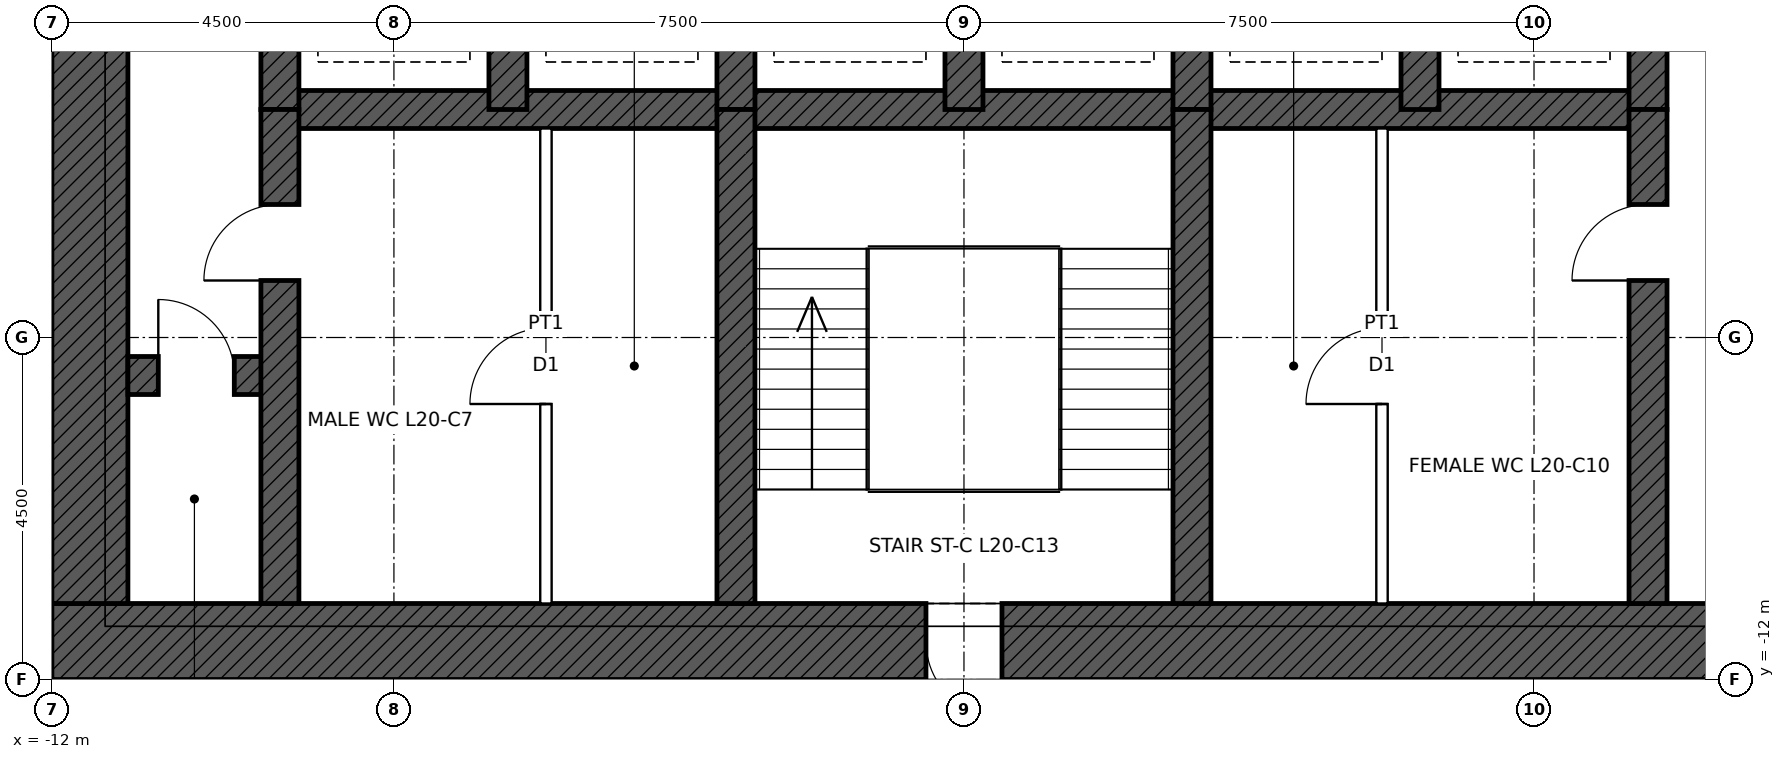
"""IFC4 building model, lengths in metres.
Left out: names, types, materials, properties, quantities, classifications, styles, units other than length and angle.
Written with IfcOpenShell. Run it as: python <this file> out.ifc"""

import sys

from ifc_helpers import new_model, si_unit, direction, frame, frame_2d, origin, place, context, subcontext, project, spatial, rectangle, extrude, element, fill, save


model = new_model("IFC4")
c1 = context("Model", 3, precision=1e-05, world=origin(), true_north=direction((0.0, 1.0)))
c2 = subcontext(c1, "Body", "Model", "MODEL_VIEW")
j1 = project(units=[si_unit("LENGTHUNIT", "METRE"), si_unit("PLANEANGLEUNIT", "RADIAN")], contexts=[c1])
p1 = place(None, origin())
s1 = spatial("IfcSite", under=j1, at=p1, CompositionType="ELEMENT")
p2 = place(p1, origin())
s2 = spatial("IfcBuilding", under=s1, at=p2, CompositionType="ELEMENT")
p3 = place(p2, frame((0.0, 0.0, 104.4)))
s3 = spatial("IfcBuildingStorey", under=s2, at=p3, CompositionType="ELEMENT", Elevation=104.4)
p4 = place(p3, frame((12.0, -11.5, 0.0), z_axis=(0.0, 0.0, 1.0), x_axis=(-1.0, 0.0, 0.0)))
e1 = element("IfcWall", 1, at=p4, inside=s3, PredefinedType="SHEAR", context=c2, shape_type="SweptSolid", body=[
    extrude(rectangle(XDim=24.0, YDim=1.0, at=frame_2d((12.0, 0.0))), origin(), (0.0, 0.0, 1.0), 4.5),
])
p5 = place(p4, frame((11.5, 0.0, 0.0)))
e2 = element("IfcOpeningElement", 2, at=p5, cuts=e1, PredefinedType="OPENING", context=c2, shape_type="SweptSolid", body=[
    extrude(rectangle(XDim=1.0, YDim=2.1, at=frame_2d((0.5, 1.05))), frame((0.0, 0.51, 0.0), z_axis=(0.0, -1.0, 0.0), x_axis=(1.0, 0.0, 0.0)), (0.0, 0.0, 1.0), 1.02),
])
p6 = place(p4, frame((1.0, 0.0, 0.0)))
e3 = element("IfcOpeningElement", 3, at=p6, cuts=e1, PredefinedType="OPENING", context=c2, shape_type="SweptSolid", body=[
    extrude(rectangle(XDim=1.0, YDim=2.4, at=frame_2d((0.5, 1.2))), frame((0.0, 0.51, 0.0), z_axis=(0.0, -1.0, 0.0), x_axis=(1.0, 0.0, 0.0)), (0.0, 0.0, 1.0), 1.02),
])
p7 = place(p3, frame((-11.5, -11.0, 0.0), z_axis=(0.0, 0.0, 1.0), x_axis=(0.0, 1.0, 0.0)))
e4 = element("IfcWall", 4, at=p7, inside=s3, PredefinedType="SHEAR", context=c2, shape_type="SweptSolid", body=[
    extrude(rectangle(XDim=22.0, YDim=1.0, at=frame_2d((11.0, 0.0))), origin(), (0.0, 0.0, 1.0), 4.5),
])
p8 = place(p7, frame((10.5, 0.0, 0.0)))
e5 = element("IfcOpeningElement", 5, at=p8, cuts=e4, PredefinedType="OPENING", context=c2, shape_type="SweptSolid", body=[
    extrude(rectangle(XDim=1.0, YDim=2.4, at=frame_2d((0.5, 1.2))), frame((0.0, 0.51, 0.0), z_axis=(0.0, -1.0, 0.0), x_axis=(1.0, 0.0, 0.0)), (0.0, 0.0, 1.0), 1.02),
])
p9 = place(p3, frame((-9.0, -4.5, 0.0), z_axis=(0.0, 0.0, 1.0), x_axis=(1.0, 0.0, 0.0)))
e6 = element("IfcWall", 6, at=p9, inside=s3, PredefinedType="SHEAR", context=c2, shape_type="SweptSolid", body=[
    extrude(rectangle(XDim=18.0, YDim=0.5, at=frame_2d((9.0, 0.0))), origin(), (0.0, 0.0, 1.0), 4.5),
])
p10 = place(p3, frame((-11.0, -8.0, 0.0), z_axis=(0.0, 0.0, 1.0), x_axis=(1.0, 0.0, 0.0)))
e7 = element("IfcWall", 7, at=p10, inside=s3, PredefinedType="SHEAR", context=c2, shape_type="SweptSolid", body=[
    extrude(rectangle(XDim=2.0, YDim=0.5, at=frame_2d((1.0, 0.0))), origin(), (0.0, 0.0, 1.0), 4.5),
])
p11 = place(p10, frame((0.4, 0.0, 0.0)))
e8 = element("IfcOpeningElement", 8, at=p11, cuts=e7, PredefinedType="OPENING", context=c2, shape_type="SweptSolid", body=[
    extrude(rectangle(XDim=1.0, YDim=2.1, at=frame_2d((0.5, 1.05))), frame((0.0, 0.26, 0.0), z_axis=(0.0, -1.0, 0.0), x_axis=(1.0, 0.0, 0.0)), (0.0, 0.0, 1.0), 0.52),
])
for number, where, z_axis, x_axis in (
    (9, (-9.0, -4.5, 0.0), (0.0, 0.0, 1.0), (0.0, 1.0, 0.0)),
    (10, (9.0, -4.5, 0.0), (0.0, 0.0, 1.0), (0.0, 1.0, 0.0)),
    (11, (-6.0, -4.5, 0.0), (0.0, 0.0, 1.0), (0.0, 1.0, 0.0)),
    (12, (-3.0, -4.5, 0.0), (0.0, 0.0, 1.0), (0.0, 1.0, 0.0)),
    (13, (0.0, -4.5, 0.0), (0.0, 0.0, 1.0), (0.0, 1.0, 0.0)),
    (14, (3.0, -4.5, 0.0), (0.0, 0.0, 1.0), (0.0, 1.0, 0.0)),
    (15, (6.0, -4.5, 0.0), (0.0, 0.0, 1.0), (0.0, 1.0, 0.0)),
):
    element("IfcWall", number, at=place(p3, frame(where, z_axis=z_axis, x_axis=x_axis)), inside=s3, PredefinedType="SHEAR", context=c2, shape_type="SweptSolid", body=[
        extrude(rectangle(XDim=3.0, YDim=0.5, at=frame_2d((1.5, 0.0))), origin(), (0.0, 0.0, 1.0), 4.5),
    ])
p12 = place(p3, frame((-9.0, -11.0, 0.0), z_axis=(0.0, 0.0, 1.0), x_axis=(0.0, 1.0, 0.0)))
e16 = element("IfcWall", 16, at=p12, inside=s3, PredefinedType="SHEAR", context=c2, shape_type="SweptSolid", body=[
    extrude(rectangle(XDim=6.5, YDim=0.5, at=frame_2d((3.25, 0.0))), origin(), (0.0, 0.0, 1.0), 4.5),
])
p13 = place(p12, frame((4.25, 0.0, 0.0)))
e17 = element("IfcOpeningElement", 17, at=p13, cuts=e16, PredefinedType="OPENING", context=c2, shape_type="SweptSolid", body=[
    extrude(rectangle(XDim=1.0, YDim=2.1, at=frame_2d((0.5, 1.05))), frame((0.0, 0.26, 0.0), z_axis=(0.0, -1.0, 0.0), x_axis=(1.0, 0.0, 0.0)), (0.0, 0.0, 1.0), 0.52),
])
p14 = place(p3, frame((9.0, -11.0, 0.0), z_axis=(0.0, 0.0, 1.0), x_axis=(0.0, 1.0, 0.0)))
e18 = element("IfcWall", 18, at=p14, inside=s3, PredefinedType="SHEAR", context=c2, shape_type="SweptSolid", body=[
    extrude(rectangle(XDim=6.5, YDim=0.5, at=frame_2d((3.25, 0.0))), origin(), (0.0, 0.0, 1.0), 4.5),
])
p15 = place(p14, frame((4.25, 0.0, 0.0)))
e19 = element("IfcOpeningElement", 19, at=p15, cuts=e18, PredefinedType="OPENING", context=c2, shape_type="SweptSolid", body=[
    extrude(rectangle(XDim=1.0, YDim=2.1, at=frame_2d((0.5, 1.05))), frame((0.0, 0.26, 0.0), z_axis=(0.0, -1.0, 0.0), x_axis=(1.0, 0.0, 0.0)), (0.0, 0.0, 1.0), 0.52),
])
for number, where, z_axis, x_axis in (
    (20, (-3.0, -11.0, 0.0), (0.0, 0.0, 1.0), (0.0, 1.0, 0.0)),
    (21, (3.0, -11.0, 0.0), (0.0, 0.0, 1.0), (0.0, 1.0, 0.0)),
):
    element("IfcWall", number, at=place(p3, frame(where, z_axis=z_axis, x_axis=x_axis)), inside=s3, PredefinedType="SHEAR", context=c2, shape_type="SweptSolid", body=[
        extrude(rectangle(XDim=6.5, YDim=0.5, at=frame_2d((3.25, 0.0))), origin(), (0.0, 0.0, 1.0), 4.5),
    ])
p16 = place(p3, frame((-5.5, -11.0, 0.0), z_axis=(0.0, 0.0, 1.0), x_axis=(0.0, 1.0, 0.0)))
e22 = element("IfcWall", 22, at=p16, inside=s3, PredefinedType="PARTITIONING", context=c2, shape_type="SweptSolid", body=[
    extrude(rectangle(XDim=6.25, YDim=0.15, at=frame_2d((3.125, 0.0))), origin(), (0.0, 0.0, 1.0), 4.25),
])
p17 = place(p16, frame((2.625, 0.0, 0.0)))
e23 = element("IfcOpeningElement", 23, at=p17, cuts=e22, PredefinedType="OPENING", context=c2, shape_type="SweptSolid", body=[
    extrude(rectangle(XDim=1.0, YDim=2.1, at=frame_2d((0.5, 1.05))), frame((0.0, 0.085, 0.0), z_axis=(0.0, -1.0, 0.0), x_axis=(1.0, 0.0, 0.0)), (0.0, 0.0, 1.0), 0.17),
])
p18 = place(p3, frame((5.5, -11.0, 0.0), z_axis=(0.0, 0.0, 1.0), x_axis=(0.0, 1.0, 0.0)))
e24 = element("IfcWall", 24, at=p18, inside=s3, PredefinedType="PARTITIONING", context=c2, shape_type="SweptSolid", body=[
    extrude(rectangle(XDim=6.25, YDim=0.15, at=frame_2d((3.125, 0.0))), origin(), (0.0, 0.0, 1.0), 4.25),
])
p19 = place(p18, frame((2.625, 0.0, 0.0)))
e25 = element("IfcOpeningElement", 25, at=p19, cuts=e24, PredefinedType="OPENING", context=c2, shape_type="SweptSolid", body=[
    extrude(rectangle(XDim=1.0, YDim=2.1, at=frame_2d((0.5, 1.05))), frame((0.0, 0.085, 0.0), z_axis=(0.0, -1.0, 0.0), x_axis=(1.0, 0.0, 0.0)), (0.0, 0.0, 1.0), 0.17),
])
p20 = place(p5, origin())
e26 = element("IfcDoor", 26, at=p20, inside=s3, OperationType="SINGLE_SWING_LEFT", PredefinedType="DOOR", context=c2, shape_type="SweptSolid", body=[
    extrude(rectangle(XDim=1.0, YDim=2.1, at=frame_2d((0.5, 1.05))), frame((0.0, 0.485, 0.0), z_axis=(0.0, -1.0, 0.0), x_axis=(1.0, 0.0, 0.0)), (0.0, 0.0, 1.0), 0.05),
])
fill(e2, e26)
p21 = place(p13, origin())
e27 = element("IfcDoor", 27, at=p21, inside=s3, OperationType="SINGLE_SWING_LEFT", PredefinedType="DOOR", context=c2, shape_type="SweptSolid", body=[
    extrude(rectangle(XDim=1.0, YDim=2.1, at=frame_2d((0.5, 1.05))), frame((0.0, 0.025, 0.0), z_axis=(0.0, -1.0, 0.0), x_axis=(1.0, 0.0, 0.0)), (0.0, 0.0, 1.0), 0.05),
])
fill(e17, e27)
p22 = place(p15, origin())
e28 = element("IfcDoor", 28, at=p22, inside=s3, OperationType="SINGLE_SWING_LEFT", PredefinedType="DOOR", context=c2, shape_type="SweptSolid", body=[
    extrude(rectangle(XDim=1.0, YDim=2.1, at=frame_2d((0.5, 1.05))), frame((0.0, 0.025, 0.0), z_axis=(0.0, -1.0, 0.0), x_axis=(1.0, 0.0, 0.0)), (0.0, 0.0, 1.0), 0.05),
])
fill(e19, e28)
p23 = place(p11, origin())
e29 = element("IfcDoor", 29, at=p23, inside=s3, OperationType="SINGLE_SWING_LEFT", PredefinedType="DOOR", context=c2, shape_type="SweptSolid", body=[
    extrude(rectangle(XDim=1.0, YDim=2.1, at=frame_2d((0.5, 1.05))), frame((0.0, 0.025, 0.0), z_axis=(0.0, -1.0, 0.0), x_axis=(1.0, 0.0, 0.0)), (0.0, 0.0, 1.0), 0.05),
])
fill(e8, e29)
p24 = place(p17, origin())
e30 = element("IfcDoor", 30, at=p24, inside=s3, OperationType="SINGLE_SWING_LEFT", PredefinedType="DOOR", context=c2, shape_type="SweptSolid", body=[
    extrude(rectangle(XDim=1.0, YDim=2.1, at=frame_2d((0.5, 1.05))), frame((0.0, 0.025, 0.0), z_axis=(0.0, -1.0, 0.0), x_axis=(1.0, 0.0, 0.0)), (0.0, 0.0, 1.0), 0.05),
])
fill(e23, e30)
p25 = place(p19, origin())
e31 = element("IfcDoor", 31, at=p25, inside=s3, OperationType="SINGLE_SWING_LEFT", PredefinedType="DOOR", context=c2, shape_type="SweptSolid", body=[
    extrude(rectangle(XDim=1.0, YDim=2.1, at=frame_2d((0.5, 1.05))), frame((0.0, 0.025, 0.0), z_axis=(0.0, -1.0, 0.0), x_axis=(1.0, 0.0, 0.0)), (0.0, 0.0, 1.0), 0.05),
])
fill(e25, e31)
save(model, sys.argv[1])
